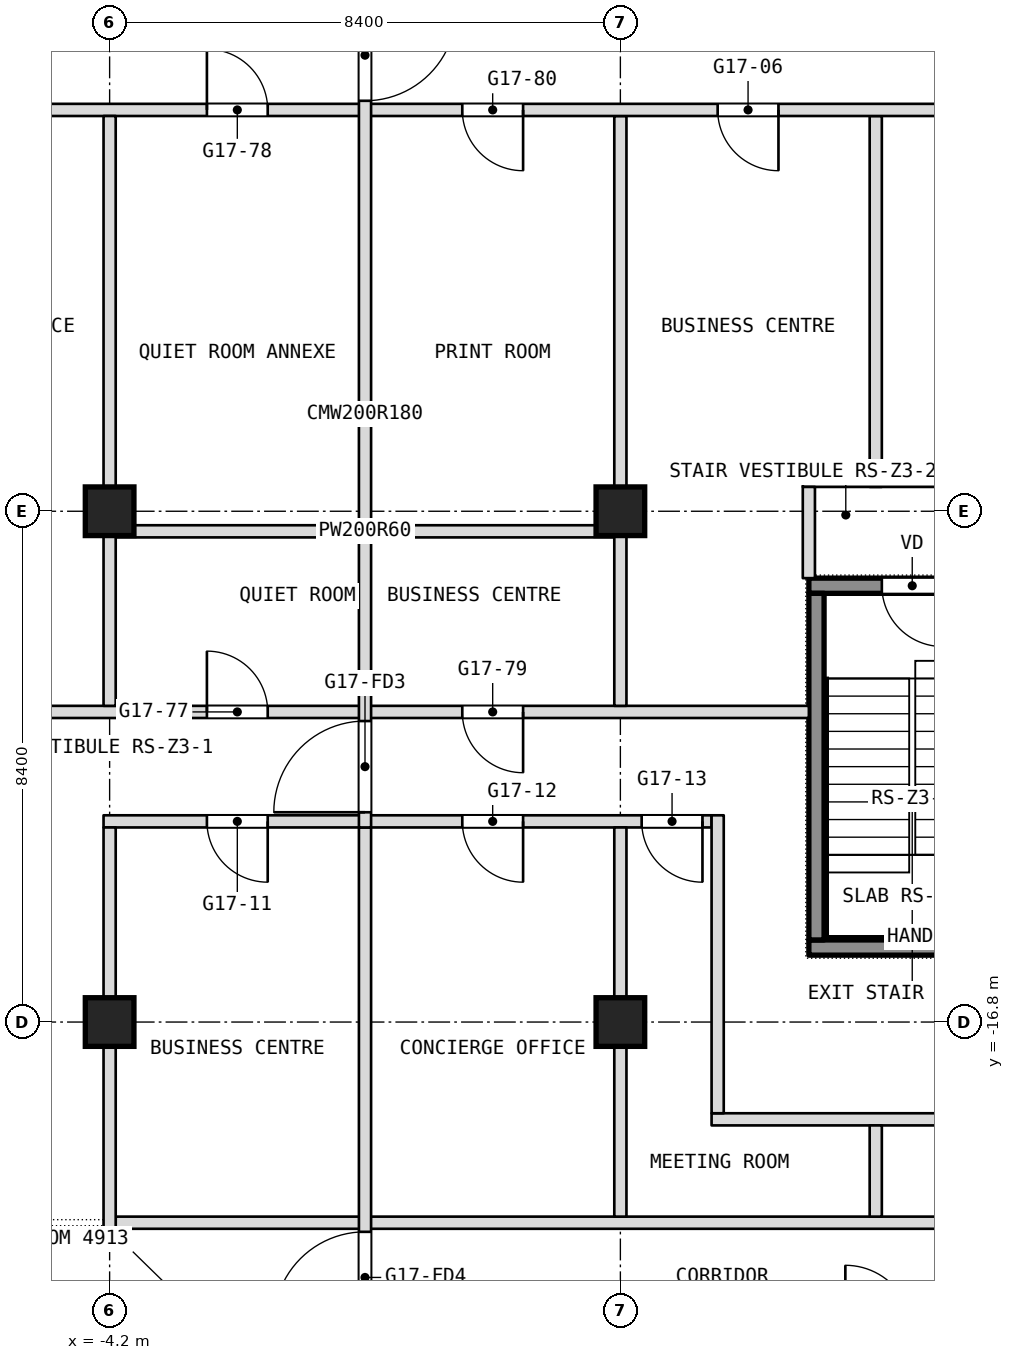
"""IFC4 building model, lengths in metres.
Left out: names, types, materials, properties, quantities, classifications, styles, units other than length and angle.
Written with IfcOpenShell. Run it as: python <this file> out.ifc"""

import sys

from ifc_helpers import new_model, si_unit, direction, frame, frame_2d, origin, origin_2d, place, context, subcontext, project, spatial, rectangle, extrude, element, fill, save


model = new_model("IFC4")
c1 = context("Model", 3, precision=1e-05, world=origin(), true_north=direction((0.0, 1.0)))
c2 = subcontext(c1, "Body", "Model", "MODEL_VIEW")
j1 = project(units=[si_unit("LENGTHUNIT", "METRE"), si_unit("PLANEANGLEUNIT", "RADIAN")], contexts=[c1])
p1 = place(None, origin())
s1 = spatial("IfcSite", under=j1, at=p1, CompositionType="ELEMENT")
p2 = place(p1, origin())
s2 = spatial("IfcBuilding", under=s1, at=p2, CompositionType="ELEMENT")
p3 = place(p2, frame((0.0, 0.0, 212.9)))
s3 = spatial("IfcBuildingStorey", under=s2, at=p3, CompositionType="ELEMENT", Elevation=212.9)
for number, where, z_axis, x_axis in (
    (1, (-4.2, -16.8, 0.0), (0.0, 0.0, 1.0), (1.0, 0.0, 0.0)),
    (2, (-4.2, -8.4, 0.0), (0.0, 0.0, 1.0), (1.0, 0.0, 0.0)),
    (3, (4.2, -16.8, 0.0), (0.0, 0.0, 1.0), (1.0, 0.0, 0.0)),
    (4, (4.2, -8.4, 0.0), (0.0, 0.0, 1.0), (1.0, 0.0, 0.0)),
):
    element("IfcColumn", number, at=place(p3, frame(where, z_axis=z_axis, x_axis=x_axis)), inside=s3, PredefinedType="COLUMN", context=c2, shape_type="SweptSolid", body=[
        extrude(rectangle(XDim=0.8, YDim=0.8, at=origin_2d()), origin(), (0.0, 0.0, 1.0), 3.6),
    ])
p4 = place(p3, frame((-4.1, -20.1, 0.0), z_axis=(0.0, 0.0, 1.0), x_axis=(1.0, 0.0, 0.0)))
e5 = element("IfcWall", 5, at=p4, inside=s3, PredefinedType="PARTITIONING", context=c2, shape_type="SweptSolid", body=[
    extrude(rectangle(XDim=20.8, YDim=0.2, at=frame_2d((10.4, 0.0))), origin(), (0.0, 0.0, 1.0), 3.34),
])
p5 = place(p3, frame((5.7, -18.4, 0.0), z_axis=(0.0, 0.0, 1.0), x_axis=(1.0, 0.0, 0.0)))
e6 = element("IfcWall", 6, at=p5, inside=s3, PredefinedType="PARTITIONING", context=c2, shape_type="SweptSolid", body=[
    extrude(rectangle(XDim=7.0, YDim=0.2, at=frame_2d((3.5, 0.0))), origin(), (0.0, 0.0, 1.0), 3.34),
])
p6 = place(p5, frame((4.3, 0.0, 0.0)))
e7 = element("IfcOpeningElement", 7, at=p6, cuts=e6, PredefinedType="OPENING", context=c2, shape_type="SweptSolid", body=[
    extrude(rectangle(XDim=1.0, YDim=2.1, at=frame_2d((0.5, 1.05))), frame((0.0, 0.1, 0.0), z_axis=(0.0, -1.0, 0.0), x_axis=(1.0, 0.0, 0.0)), (0.0, 0.0, 1.0), 0.2),
])
p7 = place(p3, frame((-4.3, -13.5, 0.0), z_axis=(0.0, 0.0, 1.0), x_axis=(1.0, 0.0, 0.0)))
e8 = element("IfcWall", 8, at=p7, inside=s3, PredefinedType="PARTITIONING", context=c2, shape_type="SweptSolid", body=[
    extrude(rectangle(XDim=10.0, YDim=0.2, at=frame_2d((5.0, 0.0))), origin(), (0.0, 0.0, 1.0), 3.34),
])
p8 = place(p7, frame((1.7, 0.0, 0.0)))
e9 = element("IfcOpeningElement", 9, at=p8, cuts=e8, PredefinedType="OPENING", context=c2, shape_type="SweptSolid", body=[
    extrude(rectangle(XDim=1.0, YDim=2.1, at=frame_2d((0.5, 1.05))), frame((0.0, 0.1, 0.0), z_axis=(0.0, -1.0, 0.0), x_axis=(1.0, 0.0, 0.0)), (0.0, 0.0, 1.0), 0.2),
])
p9 = place(p7, frame((5.9, 0.0, 0.0)))
e10 = element("IfcOpeningElement", 10, at=p9, cuts=e8, PredefinedType="OPENING", context=c2, shape_type="SweptSolid", body=[
    extrude(rectangle(XDim=1.0, YDim=2.1, at=frame_2d((0.5, 1.05))), frame((0.0, 0.1, 0.0), z_axis=(0.0, -1.0, 0.0), x_axis=(1.0, 0.0, 0.0)), (0.0, 0.0, 1.0), 0.2),
])
p10 = place(p7, frame((8.85, 0.0, 0.0)))
e11 = element("IfcOpeningElement", 11, at=p10, cuts=e8, PredefinedType="OPENING", context=c2, shape_type="SweptSolid", body=[
    extrude(rectangle(XDim=1.0, YDim=2.1, at=frame_2d((0.5, 1.05))), frame((0.0, 0.1, 0.0), z_axis=(0.0, -1.0, 0.0), x_axis=(1.0, 0.0, 0.0)), (0.0, 0.0, 1.0), 0.2),
])
p11 = place(p3, frame((-7.3, -11.7, 0.0), z_axis=(0.0, 0.0, 1.0), x_axis=(1.0, 0.0, 0.0)))
e12 = element("IfcWall", 12, at=p11, inside=s3, PredefinedType="PARTITIONING", context=c2, shape_type="SweptSolid", body=[
    extrude(rectangle(XDim=14.6, YDim=0.2, at=frame_2d((7.3, 0.0))), origin(), (0.0, 0.0, 1.0), 3.34),
])
p12 = place(p11, frame((4.7, 0.0, 0.0)))
e13 = element("IfcOpeningElement", 13, at=p12, cuts=e12, PredefinedType="OPENING", context=c2, shape_type="SweptSolid", body=[
    extrude(rectangle(XDim=1.0, YDim=2.1, at=frame_2d((0.5, 1.05))), frame((0.0, 0.1, 0.0), z_axis=(0.0, -1.0, 0.0), x_axis=(1.0, 0.0, 0.0)), (0.0, 0.0, 1.0), 0.2),
])
p13 = place(p11, frame((8.9, 0.0, 0.0)))
e14 = element("IfcOpeningElement", 14, at=p13, cuts=e12, PredefinedType="OPENING", context=c2, shape_type="SweptSolid", body=[
    extrude(rectangle(XDim=1.0, YDim=2.1, at=frame_2d((0.5, 1.05))), frame((0.0, 0.1, 0.0), z_axis=(0.0, -1.0, 0.0), x_axis=(1.0, 0.0, 0.0)), (0.0, 0.0, 1.0), 0.2),
])
p14 = place(p3, frame((-4.1, -8.73, 0.0), z_axis=(0.0, 0.0, 1.0), x_axis=(1.0, 0.0, 0.0)))
e15 = element("IfcWall", 15, at=p14, inside=s3, PredefinedType="PARTITIONING", context=c2, shape_type="SweptSolid", body=[
    extrude(rectangle(XDim=8.2, YDim=0.2, at=frame_2d((4.1, 0.0))), origin(), (0.0, 0.0, 1.0), 3.34),
])
p15 = place(p3, frame((8.4, -20.0, 0.0), z_axis=(0.0, 0.0, 1.0), x_axis=(0.0, 1.0, 0.0)))
e16 = element("IfcWall", 16, at=p15, inside=s3, PredefinedType="PARTITIONING", context=c2, shape_type="SweptSolid", body=[
    extrude(rectangle(XDim=1.5, YDim=0.2, at=frame_2d((0.75, 0.0))), origin(), (0.0, 0.0, 1.0), 3.34),
])
p16 = place(p3, frame((8.4, -8.0, 0.0), z_axis=(0.0, 0.0, 1.0), x_axis=(0.0, 1.0, 0.0)))
e17 = element("IfcWall", 17, at=p16, inside=s3, PredefinedType="PARTITIONING", context=c2, shape_type="SweptSolid", body=[
    extrude(rectangle(XDim=6.1, YDim=0.2, at=frame_2d((3.05, 0.0))), origin(), (0.0, 0.0, 1.0), 3.34),
])
p17 = place(p3, frame((7.2, -7.9, 0.0), z_axis=(0.0, 0.0, 1.0), x_axis=(1.0, 0.0, 0.0)))
e18 = element("IfcWall", 18, at=p17, inside=s3, PredefinedType="PARTITIONING", context=c2, shape_type="SweptSolid", body=[
    extrude(rectangle(XDim=3.4, YDim=0.2, at=frame_2d((1.7, 0.0))), origin(), (0.0, 0.0, 1.0), 3.34),
])
p18 = place(p3, frame((7.3, -9.5, 0.0), z_axis=(0.0, 0.0, 1.0), x_axis=(0.0, 1.0, 0.0)))
e19 = element("IfcWall", 19, at=p18, inside=s3, PredefinedType="PARTITIONING", context=c2, shape_type="SweptSolid", body=[
    extrude(rectangle(XDim=1.5, YDim=0.2, at=frame_2d((0.75, 0.0))), origin(), (0.0, 0.0, 1.0), 3.34),
])
p19 = place(p3, frame((5.8, -18.3, 0.0), z_axis=(0.0, 0.0, 1.0), x_axis=(0.0, 1.0, 0.0)))
e20 = element("IfcWall", 20, at=p19, inside=s3, PredefinedType="PARTITIONING", context=c2, shape_type="SweptSolid", body=[
    extrude(rectangle(XDim=4.9, YDim=0.2, at=frame_2d((2.45, 0.0))), origin(), (0.0, 0.0, 1.0), 3.34),
])
p20 = place(p3, frame((4.2, -20.0, 0.0), z_axis=(0.0, 0.0, 1.0), x_axis=(0.0, 1.0, 0.0)))
e21 = element("IfcWall", 21, at=p20, inside=s3, PredefinedType="PARTITIONING", context=c2, shape_type="SweptSolid", body=[
    extrude(rectangle(XDim=6.4, YDim=0.2, at=frame_2d((3.2, 0.0))), origin(), (0.0, 0.0, 1.0), 3.34),
])
p21 = place(p3, frame((4.2, -11.6, 0.0), z_axis=(0.0, 0.0, 1.0), x_axis=(0.0, 1.0, 0.0)))
e22 = element("IfcWall", 22, at=p21, inside=s3, PredefinedType="PARTITIONING", context=c2, shape_type="SweptSolid", body=[
    extrude(rectangle(XDim=9.7, YDim=0.2, at=frame_2d((4.85, 0.0))), origin(), (0.0, 0.0, 1.0), 3.34),
])
p22 = place(p3, frame((-16.9, -1.8, 0.0), z_axis=(0.0, 0.0, 1.0), x_axis=(1.0, 0.0, 0.0)))
e23 = element("IfcWall", 23, at=p22, inside=s3, PredefinedType="PARTITIONING", context=c2, shape_type="SweptSolid", body=[
    extrude(rectangle(XDim=33.8, YDim=0.2, at=frame_2d((16.9, 0.0))), origin(), (0.0, 0.0, 1.0), 3.34),
])
p23 = place(p22, frame((1.7, 0.0, 0.0)))
e24 = element("IfcOpeningElement", 24, at=p23, cuts=e23, PredefinedType="OPENING", context=c2, shape_type="SweptSolid", body=[
    extrude(rectangle(XDim=1.0, YDim=2.1, at=frame_2d((0.5, 1.05))), frame((0.0, 0.1, 0.0), z_axis=(0.0, -1.0, 0.0), x_axis=(1.0, 0.0, 0.0)), (0.0, 0.0, 1.0), 0.2),
])
p24 = place(p22, frame((5.9, 0.0, 0.0)))
e25 = element("IfcOpeningElement", 25, at=p24, cuts=e23, PredefinedType="OPENING", context=c2, shape_type="SweptSolid", body=[
    extrude(rectangle(XDim=1.0, YDim=2.1, at=frame_2d((0.5, 1.05))), frame((0.0, 0.1, 0.0), z_axis=(0.0, -1.0, 0.0), x_axis=(1.0, 0.0, 0.0)), (0.0, 0.0, 1.0), 0.2),
])
p25 = place(p22, frame((10.1, 0.0, 0.0)))
e26 = element("IfcOpeningElement", 26, at=p25, cuts=e23, PredefinedType="OPENING", context=c2, shape_type="SweptSolid", body=[
    extrude(rectangle(XDim=1.0, YDim=2.1, at=frame_2d((0.5, 1.05))), frame((0.0, 0.1, 0.0), z_axis=(0.0, -1.0, 0.0), x_axis=(1.0, 0.0, 0.0)), (0.0, 0.0, 1.0), 0.2),
])
p26 = place(p22, frame((22.7, 0.0, 0.0)))
e27 = element("IfcOpeningElement", 27, at=p26, cuts=e23, PredefinedType="OPENING", context=c2, shape_type="SweptSolid", body=[
    extrude(rectangle(XDim=1.0, YDim=2.1, at=frame_2d((0.5, 1.05))), frame((0.0, 0.1, 0.0), z_axis=(0.0, -1.0, 0.0), x_axis=(1.0, 0.0, 0.0)), (0.0, 0.0, 1.0), 0.2),
])
p27 = place(p22, frame((26.9, 0.0, 0.0)))
e28 = element("IfcOpeningElement", 28, at=p27, cuts=e23, PredefinedType="OPENING", context=c2, shape_type="SweptSolid", body=[
    extrude(rectangle(XDim=1.0, YDim=2.1, at=frame_2d((0.5, 1.05))), frame((0.0, 0.1, 0.0), z_axis=(0.0, -1.0, 0.0), x_axis=(1.0, 0.0, 0.0)), (0.0, 0.0, 1.0), 0.2),
])
p28 = place(p22, frame((31.1, 0.0, 0.0)))
e29 = element("IfcOpeningElement", 29, at=p28, cuts=e23, PredefinedType="OPENING", context=c2, shape_type="SweptSolid", body=[
    extrude(rectangle(XDim=1.0, YDim=2.1, at=frame_2d((0.5, 1.05))), frame((0.0, 0.1, 0.0), z_axis=(0.0, -1.0, 0.0), x_axis=(1.0, 0.0, 0.0)), (0.0, 0.0, 1.0), 0.2),
])
p29 = place(p22, frame((14.3, 0.0, 0.0)))
e30 = element("IfcOpeningElement", 30, at=p29, cuts=e23, PredefinedType="OPENING", context=c2, shape_type="SweptSolid", body=[
    extrude(rectangle(XDim=1.0, YDim=2.1, at=frame_2d((0.5, 1.05))), frame((0.0, 0.1, 0.0), z_axis=(0.0, -1.0, 0.0), x_axis=(1.0, 0.0, 0.0)), (0.0, 0.0, 1.0), 0.2),
])
p30 = place(p22, frame((18.5, 0.0, 0.0)))
e31 = element("IfcOpeningElement", 31, at=p30, cuts=e23, PredefinedType="OPENING", context=c2, shape_type="SweptSolid", body=[
    extrude(rectangle(XDim=1.0, YDim=2.1, at=frame_2d((0.5, 1.05))), frame((0.0, 0.1, 0.0), z_axis=(0.0, -1.0, 0.0), x_axis=(1.0, 0.0, 0.0)), (0.0, 0.0, 1.0), 0.2),
])
p31 = place(p3, frame((0.0, -22.0, 0.0), z_axis=(0.0, 0.0, 1.0), x_axis=(0.0, 1.0, 0.0)))
e32 = element("IfcWall", 32, at=p31, inside=s3, PredefinedType="PARTITIONING", context=c2, shape_type="SweptSolid", body=[
    extrude(rectangle(XDim=8.4, YDim=0.2, at=frame_2d((4.2, 0.0))), origin(), (0.0, 0.0, 1.0), 3.34),
])
p32 = place(p31, frame((0.25, 0.0, 0.0)))
e33 = element("IfcOpeningElement", 33, at=p32, cuts=e32, PredefinedType="OPENING", context=c2, shape_type="SweptSolid", body=[
    extrude(rectangle(XDim=1.5, YDim=2.1, at=frame_2d((0.75, 1.05))), frame((0.0, 0.1, 0.0), z_axis=(0.0, -1.0, 0.0), x_axis=(1.0, 0.0, 0.0)), (0.0, 0.0, 1.0), 0.2),
])
p33 = place(p3, frame((0.0, -13.6, 0.0), z_axis=(0.0, 0.0, 1.0), x_axis=(0.0, 1.0, 0.0)))
e34 = element("IfcWall", 34, at=p33, inside=s3, PredefinedType="PARTITIONING", context=c2, shape_type="SweptSolid", body=[
    extrude(rectangle(XDim=13.6, YDim=0.2, at=frame_2d((6.8, 0.0))), origin(), (0.0, 0.0, 1.0), 3.34),
])
p34 = place(p33, frame((11.95, 0.0, 0.0)))
e35 = element("IfcOpeningElement", 35, at=p34, cuts=e34, PredefinedType="OPENING", context=c2, shape_type="SweptSolid", body=[
    extrude(rectangle(XDim=1.5, YDim=2.1, at=frame_2d((0.75, 1.05))), frame((0.0, 0.1, 0.0), z_axis=(0.0, -1.0, 0.0), x_axis=(1.0, 0.0, 0.0)), (0.0, 0.0, 1.0), 0.2),
])
p35 = place(p33, frame((0.25, 0.0, 0.0)))
e36 = element("IfcOpeningElement", 36, at=p35, cuts=e34, PredefinedType="OPENING", context=c2, shape_type="SweptSolid", body=[
    extrude(rectangle(XDim=1.5, YDim=2.1, at=frame_2d((0.75, 1.05))), frame((0.0, 0.1, 0.0), z_axis=(0.0, -1.0, 0.0), x_axis=(1.0, 0.0, 0.0)), (0.0, 0.0, 1.0), 0.2),
])
p36 = place(p3, frame((-4.2, -11.6, 0.0), z_axis=(0.0, 0.0, 1.0), x_axis=(0.0, 1.0, 0.0)))
e37 = element("IfcWall", 37, at=p36, inside=s3, PredefinedType="PARTITIONING", context=c2, shape_type="SweptSolid", body=[
    extrude(rectangle(XDim=9.7, YDim=0.2, at=frame_2d((4.85, 0.0))), origin(), (0.0, 0.0, 1.0), 3.34),
])
p37 = place(p3, frame((-4.2, -20.2, 0.0), z_axis=(0.0, 0.0, 1.0), x_axis=(0.0, 1.0, 0.0)))
e38 = element("IfcWall", 38, at=p37, inside=s3, PredefinedType="PARTITIONING", context=c2, shape_type="SweptSolid", body=[
    extrude(rectangle(XDim=6.6, YDim=0.2, at=frame_2d((3.3, 0.0))), origin(), (0.0, 0.0, 1.0), 3.34),
])
p38 = place(p3, frame((7.3, -15.575, 0.1), z_axis=(0.0, 0.0, 1.0), x_axis=(1.0, 0.0, 0.0)))
e39 = element("IfcWall", 39, at=p38, inside=s3, PredefinedType="SHEAR", context=c2, shape_type="SweptSolid", body=[
    extrude(rectangle(XDim=3.4, YDim=0.25, at=frame_2d((1.7, 0.0))), origin(), (0.0, 0.0, 1.0), 3.6),
])
p39 = place(p3, frame((7.3, -9.625, 0.1), z_axis=(0.0, 0.0, 1.0), x_axis=(1.0, 0.0, 0.0)))
e40 = element("IfcWall", 40, at=p39, inside=s3, PredefinedType="SHEAR", context=c2, shape_type="SweptSolid", body=[
    extrude(rectangle(XDim=3.4, YDim=0.25, at=frame_2d((1.7, 0.0))), origin(), (0.0, 0.0, 1.0), 3.6),
])
p40 = place(p39, frame((1.2, 0.0, 0.0)))
e41 = element("IfcOpeningElement", 41, at=p40, cuts=e40, PredefinedType="OPENING", context=c2, shape_type="SweptSolid", body=[
    extrude(rectangle(XDim=1.0, YDim=2.1, at=frame_2d((0.5, 1.05))), frame((0.0, 0.125, 0.0), z_axis=(0.0, -1.0, 0.0), x_axis=(1.0, 0.0, 0.0)), (0.0, 0.0, 1.0), 0.25),
])
p41 = place(p3, frame((7.425, -15.45, 0.1), z_axis=(0.0, 0.0, 1.0), x_axis=(0.0, 1.0, 0.0)))
e42 = element("IfcWall", 42, at=p41, inside=s3, PredefinedType="SHEAR", context=c2, shape_type="SweptSolid", body=[
    extrude(rectangle(XDim=5.7, YDim=0.25, at=frame_2d((2.85, 0.0))), origin(), (0.0, 0.0, 1.0), 3.6),
])
p42 = place(p8, origin())
e43 = element("IfcDoor", 43, at=p42, inside=s3, OperationType="SINGLE_SWING_LEFT", PredefinedType="DOOR", context=c2, shape_type="SweptSolid", body=[
    extrude(rectangle(XDim=1.0, YDim=2.1, at=frame_2d((0.5, 1.05))), frame((0.0, 0.025, 0.0), z_axis=(0.0, -1.0, 0.0), x_axis=(1.0, 0.0, 0.0)), (0.0, 0.0, 1.0), 0.05),
])
fill(e9, e43)
p43 = place(p9, origin())
e44 = element("IfcDoor", 44, at=p43, inside=s3, OperationType="SINGLE_SWING_RIGHT", PredefinedType="DOOR", context=c2, shape_type="SweptSolid", body=[
    extrude(rectangle(XDim=1.0, YDim=2.1, at=frame_2d((0.5, 1.05))), frame((0.0, 0.025, 0.0), z_axis=(0.0, -1.0, 0.0), x_axis=(1.0, 0.0, 0.0)), (0.0, 0.0, 1.0), 0.05),
])
fill(e10, e44)
p44 = place(p10, origin())
e45 = element("IfcDoor", 45, at=p44, inside=s3, OperationType="SINGLE_SWING_LEFT", PredefinedType="DOOR", context=c2, shape_type="SweptSolid", body=[
    extrude(rectangle(XDim=1.0, YDim=2.1, at=frame_2d((0.5, 1.05))), frame((0.0, 0.025, 0.0), z_axis=(0.0, -1.0, 0.0), x_axis=(1.0, 0.0, 0.0)), (0.0, 0.0, 1.0), 0.05),
])
fill(e11, e45)
p45 = place(p12, origin())
e46 = element("IfcDoor", 46, at=p45, inside=s3, OperationType="SINGLE_SWING_LEFT", PredefinedType="DOOR", context=c2, shape_type="SweptSolid", body=[
    extrude(rectangle(XDim=1.0, YDim=2.1, at=frame_2d((0.5, 1.05))), frame((0.0, 0.025, 0.0), z_axis=(0.0, -1.0, 0.0), x_axis=(1.0, 0.0, 0.0)), (0.0, 0.0, 1.0), 0.05),
])
fill(e13, e46)
p46 = place(p13, origin())
e47 = element("IfcDoor", 47, at=p46, inside=s3, OperationType="SINGLE_SWING_LEFT", PredefinedType="DOOR", context=c2, shape_type="SweptSolid", body=[
    extrude(rectangle(XDim=1.0, YDim=2.1, at=frame_2d((0.5, 1.05))), frame((0.0, 0.025, 0.0), z_axis=(0.0, -1.0, 0.0), x_axis=(1.0, 0.0, 0.0)), (0.0, 0.0, 1.0), 0.05),
])
fill(e14, e47)
p47 = place(p26, origin())
e48 = element("IfcDoor", 48, at=p47, inside=s3, OperationType="SINGLE_SWING_LEFT", PredefinedType="DOOR", context=c2, shape_type="SweptSolid", body=[
    extrude(rectangle(XDim=1.0, YDim=2.1, at=frame_2d((0.5, 1.05))), frame((0.0, 0.025, 0.0), z_axis=(0.0, -1.0, 0.0), x_axis=(1.0, 0.0, 0.0)), (0.0, 0.0, 1.0), 0.05),
])
fill(e27, e48)
p48 = place(p29, origin())
e49 = element("IfcDoor", 49, at=p48, inside=s3, OperationType="SINGLE_SWING_LEFT", PredefinedType="DOOR", context=c2, shape_type="SweptSolid", body=[
    extrude(rectangle(XDim=1.0, YDim=2.1, at=frame_2d((0.5, 1.05))), frame((0.0, 0.025, 0.0), z_axis=(0.0, -1.0, 0.0), x_axis=(1.0, 0.0, 0.0)), (0.0, 0.0, 1.0), 0.05),
])
fill(e30, e49)
p49 = place(p30, origin())
e50 = element("IfcDoor", 50, at=p49, inside=s3, OperationType="SINGLE_SWING_LEFT", PredefinedType="DOOR", context=c2, shape_type="SweptSolid", body=[
    extrude(rectangle(XDim=1.0, YDim=2.1, at=frame_2d((0.5, 1.05))), frame((0.0, 0.025, 0.0), z_axis=(0.0, -1.0, 0.0), x_axis=(1.0, 0.0, 0.0)), (0.0, 0.0, 1.0), 0.05),
])
fill(e31, e50)
p50 = place(p40, origin())
e51 = element("IfcDoor", 51, at=p50, inside=s3, OperationType="SINGLE_SWING_LEFT", PredefinedType="DOOR", context=c2, shape_type="SweptSolid", body=[
    extrude(rectangle(XDim=1.0, YDim=2.1, at=frame_2d((0.5, 1.05))), frame((0.0, 0.025, 0.0), z_axis=(0.0, -1.0, 0.0), x_axis=(1.0, 0.0, 0.0)), (0.0, 0.0, 1.0), 0.05),
])
fill(e41, e51)
p51 = place(p34, origin())
e52 = element("IfcDoor", 52, at=p51, inside=s3, OperationType="DOUBLE_DOOR_DOUBLE_SWING", PredefinedType="DOOR", context=c2, shape_type="SweptSolid", body=[
    extrude(rectangle(XDim=1.5, YDim=2.1, at=frame_2d((0.75, 1.05))), frame((0.0, 0.025, 0.0), z_axis=(0.0, -1.0, 0.0), x_axis=(1.0, 0.0, 0.0)), (0.0, 0.0, 1.0), 0.05),
])
fill(e35, e52)
p52 = place(p35, origin())
e53 = element("IfcDoor", 53, at=p52, inside=s3, OperationType="DOUBLE_DOOR_DOUBLE_SWING", PredefinedType="DOOR", context=c2, shape_type="SweptSolid", body=[
    extrude(rectangle(XDim=1.5, YDim=2.1, at=frame_2d((0.75, 1.05))), frame((0.0, 0.025, 0.0), z_axis=(0.0, -1.0, 0.0), x_axis=(1.0, 0.0, 0.0)), (0.0, 0.0, 1.0), 0.05),
])
fill(e36, e53)
p53 = place(p32, origin())
e54 = element("IfcDoor", 54, at=p53, inside=s3, OperationType="DOUBLE_DOOR_DOUBLE_SWING", PredefinedType="DOOR", context=c2, shape_type="SweptSolid", body=[
    extrude(rectangle(XDim=1.5, YDim=2.1, at=frame_2d((0.75, 1.05))), frame((0.0, 0.025, 0.0), z_axis=(0.0, -1.0, 0.0), x_axis=(1.0, 0.0, 0.0)), (0.0, 0.0, 1.0), 0.05),
])
fill(e33, e54)
save(model, sys.argv[1])
